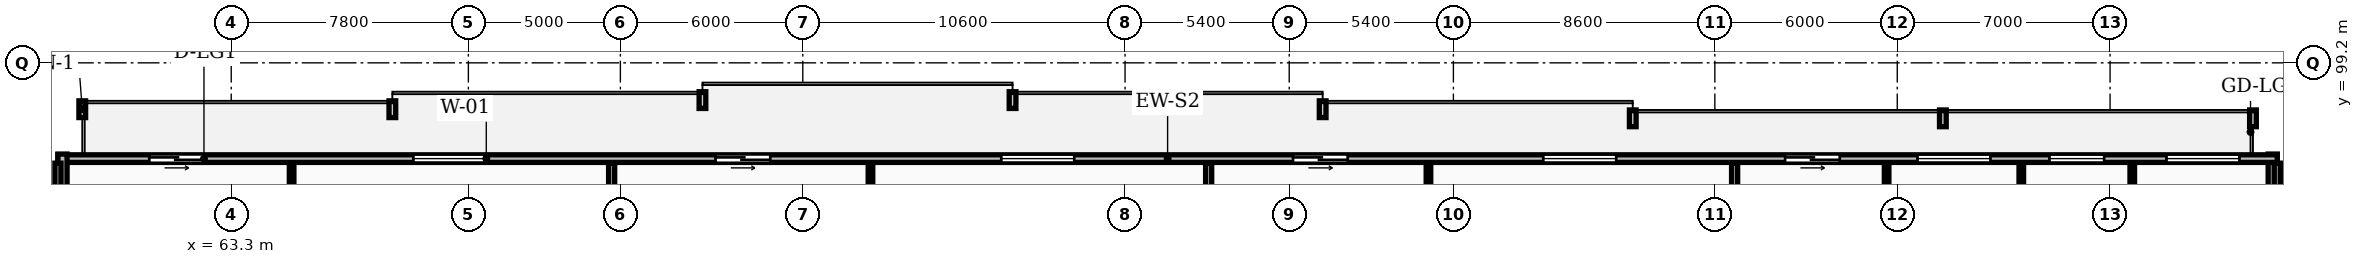
"""IFC4 building model, lengths in metres.
Left out: names, types, materials, properties, quantities, classifications, styles, units other than length and angle.
Written with IfcOpenShell. Run it as: python <this file> out.ifc"""

import sys

from ifc_helpers import new_model, si_unit, direction, frame, frame_2d, origin, place, context, subcontext, project, spatial, rectangle, extrude, element, fill, save


model = new_model("IFC4")
c1 = context("Model", 3, precision=1e-05, world=origin(), true_north=direction((0.0, 1.0)))
c2 = subcontext(c1, "Body", "Model", "MODEL_VIEW")
j1 = project(units=[si_unit("LENGTHUNIT", "METRE"), si_unit("PLANEANGLEUNIT", "RADIAN")], contexts=[c1])
p1 = place(None, origin())
s1 = spatial("IfcSite", under=j1, at=p1, CompositionType="ELEMENT")
p2 = place(p1, origin())
s2 = spatial("IfcBuilding", under=s1, at=p2, CompositionType="ELEMENT")
p3 = place(p2, frame((0.0, 0.0, 153.7)))
s3 = spatial("IfcBuildingStorey", under=s2, at=p3, CompositionType="ELEMENT", Elevation=153.7)
p4 = place(p3, frame((130.45, 92.6, 0.0), z_axis=(0.0, 0.0, 1.0), x_axis=(0.0, 1.0, 0.0)))
e1 = element("IfcWall", 1, at=p4, inside=s3, PredefinedType="STANDARD", context=c2, shape_type="SweptSolid", body=[
    extrude(rectangle(XDim=3.6, YDim=0.3, at=frame_2d((1.8, 0.0))), origin(), (0.0, 0.0, 1.0), 3.32),
])
p5 = place(p3, frame((130.6, 96.05, 0.0), z_axis=(0.0, 0.0, 1.0), x_axis=(-1.0, 0.0, 0.0)))
e2 = element("IfcWall", 2, at=p5, inside=s3, PredefinedType="STANDARD", context=c2, shape_type="SweptSolid", body=[
    extrude(rectangle(XDim=73.0, YDim=0.25, at=frame_2d((36.5, 0.0))), origin(), (0.0, 0.0, 1.0), 3.32),
])
p6 = place(p5, frame((68.197, 0.0, 0.0)))
e3 = element("IfcOpeningElement", 3, at=p6, cuts=e2, PredefinedType="OPENING", context=c2, shape_type="SweptSolid", body=[
    extrude(rectangle(XDim=1.8, YDim=2.2, at=frame_2d((0.9, 1.1))), frame((0.0, 0.135, 0.0), z_axis=(0.0, -1.0, 0.0), x_axis=(1.0, 0.0, 0.0)), (0.0, 0.0, 1.0), 0.27),
])
p7 = place(p5, frame((58.911, 0.0, 0.85)))
e4 = element("IfcOpeningElement", 4, at=p7, cuts=e2, PredefinedType="OPENING", context=c2, shape_type="SweptSolid", body=[
    extrude(rectangle(XDim=2.4, YDim=1.9, at=frame_2d((1.2, 0.95))), frame((0.0, 0.135, 0.0), z_axis=(0.0, -1.0, 0.0), x_axis=(1.0, 0.0, 0.0)), (0.0, 0.0, 1.0), 0.27),
])
p8 = place(p5, frame((49.571, 0.0, 0.0)))
e5 = element("IfcOpeningElement", 5, at=p8, cuts=e2, PredefinedType="OPENING", context=c2, shape_type="SweptSolid", body=[
    extrude(rectangle(XDim=1.8, YDim=2.2, at=frame_2d((0.9, 1.1))), frame((0.0, 0.135, 0.0), z_axis=(0.0, -1.0, 0.0), x_axis=(1.0, 0.0, 0.0)), (0.0, 0.0, 1.0), 0.27),
])
p9 = place(p5, frame((39.572, 0.0, 0.85)))
e6 = element("IfcOpeningElement", 6, at=p9, cuts=e2, PredefinedType="OPENING", context=c2, shape_type="SweptSolid", body=[
    extrude(rectangle(XDim=2.4, YDim=1.9, at=frame_2d((1.2, 0.95))), frame((0.0, 0.135, 0.0), z_axis=(0.0, -1.0, 0.0), x_axis=(1.0, 0.0, 0.0)), (0.0, 0.0, 1.0), 0.27),
])
p10 = place(p5, frame((30.575, 0.0, 0.0)))
e7 = element("IfcOpeningElement", 7, at=p10, cuts=e2, PredefinedType="OPENING", context=c2, shape_type="SweptSolid", body=[
    extrude(rectangle(XDim=1.8, YDim=2.2, at=frame_2d((0.9, 1.1))), frame((0.0, 0.135, 0.0), z_axis=(0.0, -1.0, 0.0), x_axis=(1.0, 0.0, 0.0)), (0.0, 0.0, 1.0), 0.27),
])
p11 = place(p5, frame((21.745, 0.0, 0.85)))
e8 = element("IfcOpeningElement", 8, at=p11, cuts=e2, PredefinedType="OPENING", context=c2, shape_type="SweptSolid", body=[
    extrude(rectangle(XDim=2.4, YDim=1.9, at=frame_2d((1.2, 0.95))), frame((0.0, 0.135, 0.0), z_axis=(0.0, -1.0, 0.0), x_axis=(1.0, 0.0, 0.0)), (0.0, 0.0, 1.0), 0.27),
])
p12 = place(p5, frame((9.435, 0.0, 0.85)))
e9 = element("IfcOpeningElement", 9, at=p12, cuts=e2, PredefinedType="OPENING", context=c2, shape_type="SweptSolid", body=[
    extrude(rectangle(XDim=2.4, YDim=1.9, at=frame_2d((1.2, 0.95))), frame((0.0, 0.135, 0.0), z_axis=(0.0, -1.0, 0.0), x_axis=(1.0, 0.0, 0.0)), (0.0, 0.0, 1.0), 0.27),
])
p13 = place(p5, frame((5.695, 0.0, 0.85)))
e10 = element("IfcOpeningElement", 10, at=p13, cuts=e2, PredefinedType="OPENING", context=c2, shape_type="SweptSolid", body=[
    extrude(rectangle(XDim=1.8, YDim=1.8, at=frame_2d((0.9, 0.9))), frame((0.0, 0.135, 0.0), z_axis=(0.0, -1.0, 0.0), x_axis=(1.0, 0.0, 0.0)), (0.0, 0.0, 1.0), 0.27),
])
p14 = place(p5, frame((14.39, 0.0, 0.0)))
e11 = element("IfcOpeningElement", 11, at=p14, cuts=e2, PredefinedType="OPENING", context=c2, shape_type="SweptSolid", body=[
    extrude(rectangle(XDim=1.8, YDim=2.2, at=frame_2d((0.9, 1.1))), frame((0.0, 0.135, 0.0), z_axis=(0.0, -1.0, 0.0), x_axis=(1.0, 0.0, 0.0)), (0.0, 0.0, 1.0), 0.27),
])
p15 = place(p5, frame((1.245, 0.0, 0.85)))
e12 = element("IfcOpeningElement", 12, at=p15, cuts=e2, PredefinedType="OPENING", context=c2, shape_type="SweptSolid", body=[
    extrude(rectangle(XDim=2.4, YDim=1.9, at=frame_2d((1.2, 0.95))), frame((0.0, 0.135, 0.0), z_axis=(0.0, -1.0, 0.0), x_axis=(1.0, 0.0, 0.0)), (0.0, 0.0, 1.0), 0.27),
])
p16 = place(p3, frame((57.75, 96.2, 0.0), z_axis=(0.0, 0.0, 1.0), x_axis=(0.0, -1.0, 0.0)))
e13 = element("IfcWall", 13, at=p16, inside=s3, PredefinedType="STANDARD", context=c2, shape_type="SweptSolid", body=[
    extrude(rectangle(XDim=3.6, YDim=0.3, at=frame_2d((1.8, 0.0))), origin(), (0.0, 0.0, 1.0), 3.32),
])
for number, where, z_axis, x_axis in (
    (14, (57.6, 69.83, 0.0), (0.0, 0.0, 1.0), (0.0, 1.0, 0.0)),
    (15, (130.6, 69.83, 0.0), (0.0, 0.0, 1.0), (0.0, 1.0, 0.0)),
):
    element("IfcWall", number, at=place(p3, frame(where, z_axis=z_axis, x_axis=x_axis)), inside=s3, PredefinedType="PARTITIONING", context=c2, shape_type="SweptSolid", body=[
        extrude(rectangle(XDim=26.07, YDim=0.2, at=frame_2d((13.035, 0.0))), origin(), (0.0, 0.0, 1.0), 3.32),
    ])
p17 = place(p3, frame((75.812, 69.83, 0.0), z_axis=(0.0, 0.0, 1.0), x_axis=(0.0, 1.0, 0.0)))
e16 = element("IfcWall", 16, at=p17, inside=s3, PredefinedType="PARTITIONING", context=c2, shape_type="SweptSolid", body=[
    extrude(rectangle(XDim=26.07, YDim=0.2, at=frame_2d((13.035, 0.0))), origin(), (0.0, 0.0, 1.0), 2.627),
])
p18 = place(p3, frame((65.286, 90.73, 0.0), z_axis=(0.0, 0.0, 1.0), x_axis=(0.0, 1.0, 0.0)))
e17 = element("IfcWall", 17, at=p18, inside=s3, PredefinedType="PARTITIONING", context=c2, shape_type="SweptSolid", body=[
    extrude(rectangle(XDim=5.17, YDim=0.15, at=frame_2d((2.585, 0.0))), origin(), (0.0, 0.0, 1.0), 3.32),
])
p19 = place(p3, frame((95.45, 69.83, 0.0), z_axis=(0.0, 0.0, 1.0), x_axis=(0.0, 1.0, 0.0)))
e18 = element("IfcWall", 18, at=p19, inside=s3, PredefinedType="PARTITIONING", context=c2, shape_type="SweptSolid", body=[
    extrude(rectangle(XDim=26.07, YDim=0.2, at=frame_2d((13.035, 0.0))), origin(), (0.0, 0.0, 1.0), 3.32),
])
p20 = place(p3, frame((84.326, 90.73, 0.0), z_axis=(0.0, 0.0, 1.0), x_axis=(0.0, 1.0, 0.0)))
e19 = element("IfcWall", 19, at=p20, inside=s3, PredefinedType="PARTITIONING", context=c2, shape_type="SweptSolid", body=[
    extrude(rectangle(XDim=5.17, YDim=0.15, at=frame_2d((2.585, 0.0))), origin(), (0.0, 0.0, 1.0), 2.627),
])
p21 = place(p3, frame((112.75, 69.83, 0.0), z_axis=(0.0, 0.0, 1.0), x_axis=(0.0, 1.0, 0.0)))
e20 = element("IfcWall", 20, at=p21, inside=s3, PredefinedType="PARTITIONING", context=c2, shape_type="SweptSolid", body=[
    extrude(rectangle(XDim=26.07, YDim=0.2, at=frame_2d((13.035, 0.0))), origin(), (0.0, 0.0, 1.0), 3.32),
])
p22 = place(p3, frame((102.68, 90.73, 0.0), z_axis=(0.0, 0.0, 1.0), x_axis=(0.0, 1.0, 0.0)))
e21 = element("IfcWall", 21, at=p22, inside=s3, PredefinedType="PARTITIONING", context=c2, shape_type="SweptSolid", body=[
    extrude(rectangle(XDim=5.17, YDim=0.15, at=frame_2d((2.585, 0.0))), origin(), (0.0, 0.0, 1.0), 2.627),
])
p23 = place(p3, frame((122.18, 90.73, 0.0), z_axis=(0.0, 0.0, 1.0), x_axis=(0.0, 1.0, 0.0)))
e22 = element("IfcWall", 22, at=p23, inside=s3, PredefinedType="PARTITIONING", context=c2, shape_type="SweptSolid", body=[
    extrude(rectangle(XDim=5.17, YDim=0.15, at=frame_2d((2.585, 0.0))), origin(), (0.0, 0.0, 1.0), 3.32),
])
p24 = place(p3, frame((117.75, 85.59, 0.0), z_axis=(0.0, 0.0, 1.0), x_axis=(0.0, 1.0, 0.0)))
e23 = element("IfcWall", 23, at=p24, inside=s3, PredefinedType="PARTITIONING", context=c2, shape_type="SweptSolid", body=[
    extrude(rectangle(XDim=10.31, YDim=0.15, at=frame_2d((5.155, 0.0))), origin(), (0.0, 0.0, 1.0), 3.32),
])
p25 = place(p24, frame((3.82, 0.0, 0.0)))
e24 = element("IfcOpeningElement", 24, at=p25, cuts=e23, PredefinedType="OPENING", context=c2, shape_type="SweptSolid", body=[
    extrude(rectangle(XDim=0.92, YDim=2.08, at=frame_2d((0.46, 1.04))), frame((0.0, 0.085, 0.0), z_axis=(0.0, -1.0, 0.0), x_axis=(1.0, 0.0, 0.0)), (0.0, 0.0, 1.0), 0.17),
])
p26 = place(p3, frame((125.83, 88.21, 0.0), z_axis=(0.0, 0.0, 1.0), x_axis=(0.0, 1.0, 0.0)))
e25 = element("IfcWall", 25, at=p26, inside=s3, PredefinedType="PARTITIONING", context=c2, shape_type="SweptSolid", body=[
    extrude(rectangle(XDim=7.69, YDim=0.15, at=frame_2d((3.845, 0.0))), origin(), (0.0, 0.0, 1.0), 3.32),
])
p27 = place(p26, frame((1.2, 0.0, 0.0)))
e26 = element("IfcOpeningElement", 26, at=p27, cuts=e25, PredefinedType="OPENING", context=c2, shape_type="SweptSolid", body=[
    extrude(rectangle(XDim=0.92, YDim=2.08, at=frame_2d((0.46, 1.04))), frame((0.0, 0.085, 0.0), z_axis=(0.0, -1.0, 0.0), x_axis=(1.0, 0.0, 0.0)), (0.0, 0.0, 1.0), 0.17),
])
p28 = place(p6, origin())
e27 = element("IfcDoor", 27, at=p28, inside=s3, OperationType="SLIDING_TO_LEFT", PredefinedType="DOOR", context=c2, shape_type="SweptSolid", body=[
    extrude(rectangle(XDim=1.8, YDim=2.2, at=frame_2d((0.9, 1.1))), frame((0.0, 0.025, 0.0), z_axis=(0.0, -1.0, 0.0), x_axis=(1.0, 0.0, 0.0)), (0.0, 0.0, 1.0), 0.05),
])
fill(e3, e27)
p29 = place(p7, origin())
e28 = element("IfcWindow", 28, at=p29, inside=s3, PartitioningType="DOUBLE_PANEL_VERTICAL", PredefinedType="WINDOW", context=c2, shape_type="SweptSolid", body=[
    extrude(rectangle(XDim=2.4, YDim=1.9, at=frame_2d((1.2, 0.95))), frame((0.0, 0.03, 0.0), z_axis=(0.0, -1.0, 0.0), x_axis=(1.0, 0.0, 0.0)), (0.0, 0.0, 1.0), 0.06),
])
fill(e4, e28)
p30 = place(p8, origin())
e29 = element("IfcDoor", 29, at=p30, inside=s3, OperationType="SLIDING_TO_LEFT", PredefinedType="DOOR", context=c2, shape_type="SweptSolid", body=[
    extrude(rectangle(XDim=1.8, YDim=2.2, at=frame_2d((0.9, 1.1))), frame((0.0, 0.025, 0.0), z_axis=(0.0, -1.0, 0.0), x_axis=(1.0, 0.0, 0.0)), (0.0, 0.0, 1.0), 0.05),
])
fill(e5, e29)
p31 = place(p9, origin())
e30 = element("IfcWindow", 30, at=p31, inside=s3, PartitioningType="DOUBLE_PANEL_VERTICAL", PredefinedType="WINDOW", context=c2, shape_type="SweptSolid", body=[
    extrude(rectangle(XDim=2.4, YDim=1.9, at=frame_2d((1.2, 0.95))), frame((0.0, 0.03, 0.0), z_axis=(0.0, -1.0, 0.0), x_axis=(1.0, 0.0, 0.0)), (0.0, 0.0, 1.0), 0.06),
])
fill(e6, e30)
p32 = place(p10, origin())
e31 = element("IfcDoor", 31, at=p32, inside=s3, OperationType="SLIDING_TO_LEFT", PredefinedType="DOOR", context=c2, shape_type="SweptSolid", body=[
    extrude(rectangle(XDim=1.8, YDim=2.2, at=frame_2d((0.9, 1.1))), frame((0.0, 0.025, 0.0), z_axis=(0.0, -1.0, 0.0), x_axis=(1.0, 0.0, 0.0)), (0.0, 0.0, 1.0), 0.05),
])
fill(e7, e31)
p33 = place(p11, origin())
e32 = element("IfcWindow", 32, at=p33, inside=s3, PartitioningType="DOUBLE_PANEL_VERTICAL", PredefinedType="WINDOW", context=c2, shape_type="SweptSolid", body=[
    extrude(rectangle(XDim=2.4, YDim=1.9, at=frame_2d((1.2, 0.95))), frame((0.0, 0.03, 0.0), z_axis=(0.0, -1.0, 0.0), x_axis=(1.0, 0.0, 0.0)), (0.0, 0.0, 1.0), 0.06),
])
fill(e8, e32)
p34 = place(p12, origin())
e33 = element("IfcWindow", 33, at=p34, inside=s3, PartitioningType="DOUBLE_PANEL_VERTICAL", PredefinedType="WINDOW", context=c2, shape_type="SweptSolid", body=[
    extrude(rectangle(XDim=2.4, YDim=1.9, at=frame_2d((1.2, 0.95))), frame((0.0, 0.03, 0.0), z_axis=(0.0, -1.0, 0.0), x_axis=(1.0, 0.0, 0.0)), (0.0, 0.0, 1.0), 0.06),
])
fill(e9, e33)
p35 = place(p13, origin())
e34 = element("IfcWindow", 34, at=p35, inside=s3, PartitioningType="SINGLE_PANEL", PredefinedType="WINDOW", context=c2, shape_type="SweptSolid", body=[
    extrude(rectangle(XDim=1.8, YDim=1.8, at=frame_2d((0.9, 0.9))), frame((0.0, 0.03, 0.0), z_axis=(0.0, -1.0, 0.0), x_axis=(1.0, 0.0, 0.0)), (0.0, 0.0, 1.0), 0.06),
])
fill(e10, e34)
p36 = place(p14, origin())
e35 = element("IfcDoor", 35, at=p36, inside=s3, OperationType="SLIDING_TO_LEFT", PredefinedType="DOOR", context=c2, shape_type="SweptSolid", body=[
    extrude(rectangle(XDim=1.8, YDim=2.2, at=frame_2d((0.9, 1.1))), frame((0.0, 0.025, 0.0), z_axis=(0.0, -1.0, 0.0), x_axis=(1.0, 0.0, 0.0)), (0.0, 0.0, 1.0), 0.05),
])
fill(e11, e35)
p37 = place(p15, origin())
e36 = element("IfcWindow", 36, at=p37, inside=s3, PartitioningType="DOUBLE_PANEL_VERTICAL", PredefinedType="WINDOW", context=c2, shape_type="SweptSolid", body=[
    extrude(rectangle(XDim=2.4, YDim=1.9, at=frame_2d((1.2, 0.95))), frame((0.0, 0.03, 0.0), z_axis=(0.0, -1.0, 0.0), x_axis=(1.0, 0.0, 0.0)), (0.0, 0.0, 1.0), 0.06),
])
fill(e12, e36)
save(model, sys.argv[1])
